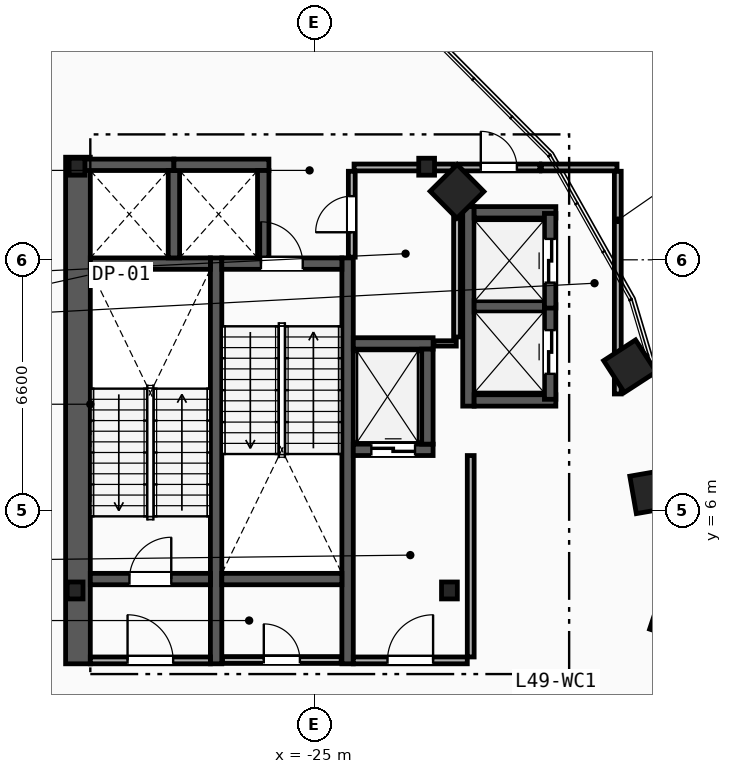
"""IFC4 building model, lengths in metres.
Left out: names, types, materials, properties, quantities, classifications, styles, units other than length and angle.
Written with IfcOpenShell. Run it as: python <this file> out.ifc"""

import sys

from ifc_helpers import new_model, si_unit, direction, frame, frame_2d, origin, origin_2d, place, context, subcontext, project, spatial, rectangle, i_section, extrude, element, fill, save


model = new_model("IFC4")
c1 = context("Model", 3, precision=1e-05, world=origin(), true_north=direction((0.0, 1.0)))
c2 = subcontext(c1, "Body", "Model", "MODEL_VIEW")
j1 = project(units=[si_unit("LENGTHUNIT", "METRE"), si_unit("PLANEANGLEUNIT", "RADIAN")], contexts=[c1])
p1 = place(None, origin())
s1 = spatial("IfcSite", under=j1, at=p1, CompositionType="ELEMENT")
p2 = place(p1, origin())
s2 = spatial("IfcBuilding", under=s1, at=p2, CompositionType="ELEMENT")
p3 = place(p2, frame((0.0, 0.0, 187.2)))
s3 = spatial("IfcBuildingStorey", under=s2, at=p3, CompositionType="ELEMENT", Elevation=187.2)
for number, where, z_axis, x_axis in (
    (1, (-31.3, 3.9, 0.0), (0.0, 0.0, 1.0), (1.0, 0.0, 0.0)),
    (2, (-21.45, 3.9, 0.0), (0.0, 0.0, 1.0), (1.0, 0.0, 0.0)),
    (3, (-22.05, 15.05, 0.0), (0.0, 0.0, 1.0), (1.0, 0.0, 0.0)),
    (4, (-31.25, 15.05, 0.0), (0.0, 0.0, 1.0), (1.0, 0.0, 0.0)),
):
    element("IfcColumn", number, at=place(p3, frame(where, z_axis=z_axis, x_axis=x_axis)), inside=s3, PredefinedType="COLUMN", context=c2, shape_type="SweptSolid", body=[
        extrude(i_section(OverallWidth=0.416, OverallDepth=0.446, WebThickness=0.039, FlangeThickness=0.063, FilletRadius=0.018, at=origin_2d()), origin(), (0.0, 0.0, 1.0), 4.6),
    ])
for number, where, z_axis, x_axis in (
    (5, (-15.55, 3.2, 0.0), (0.0, 0.0, 1.0), (0.315, 0.949, 0.0)),
    (6, (-16.125, 6.5, 0.0), (0.0, 0.0, 1.0), (-0.172, 0.985, 0.0)),
    (7, (-16.7, 9.8, 0.0), (0.0, 0.0, 1.0), (-0.544, 0.839, 0.0)),
    (8, (-21.25, 14.4, 0.0), (0.0, 0.0, 1.0), (-0.703, 0.711, 0.0)),
):
    element("IfcColumn", number, at=place(p3, frame(where, z_axis=z_axis, x_axis=x_axis)), inside=s3, PredefinedType="COLUMN", context=c2, shape_type="SweptSolid", body=[
        extrude(rectangle(XDim=1.0, YDim=1.0, at=origin_2d()), origin(), (0.0, 0.0, 1.0), 4.6),
    ])
p4 = place(p3, frame((-31.225, 1.97, 0.0), z_axis=(0.0, 0.0, 1.0), x_axis=(0.0, 1.0, 0.0)))
e9 = element("IfcWall", 9, at=p4, inside=s3, PredefinedType="SHEAR", context=c2, shape_type="SweptSolid", body=[
    extrude(rectangle(XDim=13.33, YDim=0.65, at=frame_2d((6.665, 0.0))), origin(), (0.0, 0.0, 1.0), 4.34),
])
for number, where, z_axis, x_axis in (
    (10, (-27.59, 1.97, 0.0), (0.0, 0.0, 1.0), (0.0, 1.0, 0.0)),
    (11, (-24.13, 1.97, 0.0), (0.0, 0.0, 1.0), (0.0, 1.0, 0.0)),
):
    element("IfcWall", number, at=place(p3, frame(where, z_axis=z_axis, x_axis=x_axis)), inside=s3, PredefinedType="SHEAR", context=c2, shape_type="SweptSolid", body=[
        extrude(rectangle(XDim=10.68, YDim=0.3, at=frame_2d((5.34, 0.0))), origin(), (0.0, 0.0, 1.0), 4.34),
    ])
p5 = place(p3, frame((-30.9, 4.2, 0.0), z_axis=(0.0, 0.0, 1.0), x_axis=(1.0, 0.0, 0.0)))
e12 = element("IfcWall", 12, at=p5, inside=s3, PredefinedType="SHEAR", context=c2, shape_type="SweptSolid", body=[
    extrude(rectangle(XDim=3.16, YDim=0.3, at=frame_2d((1.58, 0.0))), origin(), (0.0, 0.0, 1.0), 4.34),
])
p6 = place(p5, frame((1.03, 0.0, 0.0)))
e13 = element("IfcOpeningElement", 13, at=p6, cuts=e12, PredefinedType="OPENING", context=c2, shape_type="SweptSolid", body=[
    extrude(rectangle(XDim=1.1, YDim=2.15, at=frame_2d((0.55, 1.075))), frame((0.0, 0.16, 0.0), z_axis=(0.0, -1.0, 0.0), x_axis=(1.0, 0.0, 0.0)), (0.0, 0.0, 1.0), 0.32),
])
p7 = place(p3, frame((-30.9, 12.5, 0.0), z_axis=(0.0, 0.0, 1.0), x_axis=(1.0, 0.0, 0.0)))
e14 = element("IfcWall", 14, at=p7, inside=s3, PredefinedType="SHEAR", context=c2, shape_type="SweptSolid", body=[
    extrude(rectangle(XDim=3.16, YDim=0.3, at=frame_2d((1.58, 0.0))), origin(), (0.0, 0.0, 1.0), 4.34),
])
p8 = place(p3, frame((-27.44, 12.5, 0.0), z_axis=(0.0, 0.0, 1.0), x_axis=(1.0, 0.0, 0.0)))
e15 = element("IfcWall", 15, at=p8, inside=s3, PredefinedType="SHEAR", context=c2, shape_type="SweptSolid", body=[
    extrude(rectangle(XDim=3.16, YDim=0.3, at=frame_2d((1.58, 0.0))), origin(), (0.0, 0.0, 1.0), 4.34),
])
p9 = place(p8, frame((1.03, 0.0, 0.0)))
e16 = element("IfcOpeningElement", 16, at=p9, cuts=e15, PredefinedType="OPENING", context=c2, shape_type="SweptSolid", body=[
    extrude(rectangle(XDim=1.1, YDim=2.15, at=frame_2d((0.55, 1.075))), frame((0.0, 0.16, 0.0), z_axis=(0.0, -1.0, 0.0), x_axis=(1.0, 0.0, 0.0)), (0.0, 0.0, 1.0), 0.32),
])
p10 = place(p3, frame((-27.44, 4.2, 0.0), z_axis=(0.0, 0.0, 1.0), x_axis=(1.0, 0.0, 0.0)))
e17 = element("IfcWall", 17, at=p10, inside=s3, PredefinedType="SHEAR", context=c2, shape_type="SweptSolid", body=[
    extrude(rectangle(XDim=3.16, YDim=0.3, at=frame_2d((1.58, 0.0))), origin(), (0.0, 0.0, 1.0), 4.34),
])
p11 = place(p3, frame((-20.89, 2.15, 0.0), z_axis=(0.0, 0.0, 1.0), x_axis=(0.0, 1.0, 0.0)))
e18 = element("IfcWall", 18, at=p11, inside=s3, PredefinedType="PARTITIONING", context=c2, shape_type="SweptSolid", body=[
    extrude(rectangle(XDim=5.3, YDim=0.18, at=frame_2d((2.65, 0.0))), origin(), (0.0, 0.0, 1.0), 4.34),
])
p12 = place(p3, frame((-23.98, 2.06, 0.0), z_axis=(0.0, 0.0, 1.0), x_axis=(1.0, 0.0, 0.0)))
e19 = element("IfcWall", 19, at=p12, inside=s3, PredefinedType="PARTITIONING", context=c2, shape_type="SweptSolid", body=[
    extrude(rectangle(XDim=3.0, YDim=0.18, at=frame_2d((1.5, 0.0))), origin(), (0.0, 0.0, 1.0), 4.34),
])
p13 = place(p12, frame((0.9, 0.0, 0.0)))
e20 = element("IfcOpeningElement", 20, at=p13, cuts=e19, PredefinedType="OPENING", context=c2, shape_type="SweptSolid", body=[
    extrude(rectangle(XDim=1.2, YDim=2.15, at=frame_2d((0.6, 1.075))), frame((0.0, 0.1, 0.0), z_axis=(0.0, -1.0, 0.0), x_axis=(1.0, 0.0, 0.0)), (0.0, 0.0, 1.0), 0.2),
])
p14 = place(p3, frame((-30.9, 2.06, 0.0), z_axis=(0.0, 0.0, 1.0), x_axis=(1.0, 0.0, 0.0)))
e21 = element("IfcWall", 21, at=p14, inside=s3, PredefinedType="PARTITIONING", context=c2, shape_type="SweptSolid", body=[
    extrude(rectangle(XDim=3.16, YDim=0.18, at=frame_2d((1.58, 0.0))), origin(), (0.0, 0.0, 1.0), 4.34),
])
p15 = place(p14, frame((0.98, 0.0, 0.0)))
e22 = element("IfcOpeningElement", 22, at=p15, cuts=e21, PredefinedType="OPENING", context=c2, shape_type="SweptSolid", body=[
    extrude(rectangle(XDim=1.2, YDim=2.15, at=frame_2d((0.6, 1.075))), frame((0.0, 0.1, 0.0), z_axis=(0.0, -1.0, 0.0), x_axis=(1.0, 0.0, 0.0)), (0.0, 0.0, 1.0), 0.2),
])
p16 = place(p3, frame((-23.98, 7.6, 0.0), z_axis=(0.0, 0.0, 1.0), x_axis=(1.0, 0.0, 0.0)))
e23 = element("IfcWall", 23, at=p16, inside=s3, PredefinedType="SHEAR", context=c2, shape_type="SweptSolid", body=[
    extrude(rectangle(XDim=2.1, YDim=0.3, at=frame_2d((1.05, 0.0))), origin(), (0.0, 0.0, 1.0), 4.34),
])
p17 = place(p16, frame((0.475, 0.0, 0.0)))
e24 = element("IfcOpeningElement", 24, at=p17, cuts=e23, PredefinedType="OPENING", context=c2, shape_type="SweptSolid", body=[
    extrude(rectangle(XDim=1.15, YDim=2.2, at=frame_2d((0.575, 1.1))), frame((0.0, 0.16, 0.0), z_axis=(0.0, -1.0, 0.0), x_axis=(1.0, 0.0, 0.0)), (0.0, 0.0, 1.0), 0.32),
])
p18 = place(p3, frame((-23.98, 10.4, 0.0), z_axis=(0.0, 0.0, 1.0), x_axis=(1.0, 0.0, 0.0)))
e25 = element("IfcWall", 25, at=p18, inside=s3, PredefinedType="SHEAR", context=c2, shape_type="SweptSolid", body=[
    extrude(rectangle(XDim=2.1, YDim=0.3, at=frame_2d((1.05, 0.0))), origin(), (0.0, 0.0, 1.0), 4.34),
])
for number, where, z_axis, x_axis in (
    (26, (-22.03, 7.75, 0.0), (0.0, 0.0, 1.0), (0.0, 1.0, 0.0)),
    (27, (-31.2, 15.1, 0.0), (0.0, 0.0, 1.0), (1.0, 0.0, 0.0)),
):
    element("IfcWall", number, at=place(p3, frame(where, z_axis=z_axis, x_axis=x_axis)), inside=s3, PredefinedType="SHEAR", context=c2, shape_type="SweptSolid", body=[
        extrude(rectangle(XDim=2.5, YDim=0.3, at=frame_2d((1.25, 0.0))), origin(), (0.0, 0.0, 1.0), 4.34),
    ])
p19 = place(p3, frame((-28.7, 12.65, 0.0), z_axis=(0.0, 0.0, 1.0), x_axis=(0.0, 1.0, 0.0)))
e28 = element("IfcWall", 28, at=p19, inside=s3, PredefinedType="SHEAR", context=c2, shape_type="SweptSolid", body=[
    extrude(rectangle(XDim=2.3, YDim=0.3, at=frame_2d((1.15, 0.0))), origin(), (0.0, 0.0, 1.0), 4.34),
])
p20 = place(p3, frame((-28.7, 15.1, 0.0), z_axis=(0.0, 0.0, 1.0), x_axis=(1.0, 0.0, 0.0)))
e29 = element("IfcWall", 29, at=p20, inside=s3, PredefinedType="SHEAR", context=c2, shape_type="SweptSolid", body=[
    extrude(rectangle(XDim=2.5, YDim=0.3, at=frame_2d((1.25, 0.0))), origin(), (0.0, 0.0, 1.0), 4.34),
])
p21 = place(p3, frame((-26.35, 12.65, 0.0), z_axis=(0.0, 0.0, 1.0), x_axis=(0.0, 1.0, 0.0)))
e30 = element("IfcWall", 30, at=p21, inside=s3, PredefinedType="SHEAR", context=c2, shape_type="SweptSolid", body=[
    extrude(rectangle(XDim=2.3, YDim=0.3, at=frame_2d((1.15, 0.0))), origin(), (0.0, 0.0, 1.0), 4.34),
])
p22 = place(p3, frame((-20.95, 8.75, 0.0), z_axis=(0.0, 0.0, 1.0), x_axis=(0.0, 1.0, 0.0)))
e31 = element("IfcWall", 31, at=p22, inside=s3, PredefinedType="SHEAR", context=c2, shape_type="SweptSolid", body=[
    extrude(rectangle(XDim=5.25, YDim=0.3, at=frame_2d((2.625, 0.0))), origin(), (0.0, 0.0, 1.0), 4.34),
])
for number, where, z_axis, x_axis in (
    (32, (-20.8, 8.9, 0.0), (0.0, 0.0, 1.0), (1.0, 0.0, 0.0)),
    (33, (-20.8, 13.85, 0.0), (0.0, 0.0, 1.0), (1.0, 0.0, 0.0)),
):
    element("IfcWall", number, at=place(p3, frame(where, z_axis=z_axis, x_axis=x_axis)), inside=s3, PredefinedType="SHEAR", context=c2, shape_type="SweptSolid", body=[
        extrude(rectangle(XDim=2.15, YDim=0.3, at=frame_2d((1.075, 0.0))), origin(), (0.0, 0.0, 1.0), 4.34),
    ])
p23 = place(p3, frame((-20.8, 11.375, 0.0), z_axis=(0.0, 0.0, 1.0), x_axis=(1.0, 0.0, 0.0)))
e34 = element("IfcWall", 34, at=p23, inside=s3, PredefinedType="SHEAR", context=c2, shape_type="SweptSolid", body=[
    extrude(rectangle(XDim=1.85, YDim=0.3, at=frame_2d((0.925, 0.0))), origin(), (0.0, 0.0, 1.0), 4.34),
])
p24 = place(p3, frame((-18.8, 8.93, 0.0), z_axis=(0.0, 0.0, 1.0), x_axis=(0.0, 1.0, 0.0)))
e35 = element("IfcWall", 35, at=p24, inside=s3, PredefinedType="SHEAR", context=c2, shape_type="SweptSolid", body=[
    extrude(rectangle(XDim=2.49, YDim=0.3, at=frame_2d((1.245, 0.0))), origin(), (0.0, 0.0, 1.0), 4.34),
])
p25 = place(p24, frame((0.67, 0.0, 0.0)))
e36 = element("IfcOpeningElement", 36, at=p25, cuts=e35, PredefinedType="OPENING", context=c2, shape_type="SweptSolid", body=[
    extrude(rectangle(XDim=1.15, YDim=2.2, at=frame_2d((0.575, 1.1))), frame((0.0, 0.16, 0.0), z_axis=(0.0, -1.0, 0.0), x_axis=(1.0, 0.0, 0.0)), (0.0, 0.0, 1.0), 0.32),
])
p26 = place(p3, frame((-18.8, 11.33, 0.0), z_axis=(0.0, 0.0, 1.0), x_axis=(0.0, 1.0, 0.0)))
e37 = element("IfcWall", 37, at=p26, inside=s3, PredefinedType="SHEAR", context=c2, shape_type="SweptSolid", body=[
    extrude(rectangle(XDim=2.49, YDim=0.3, at=frame_2d((1.245, 0.0))), origin(), (0.0, 0.0, 1.0), 4.34),
])
p27 = place(p26, frame((0.67, 0.0, 0.0)))
e38 = element("IfcOpeningElement", 38, at=p27, cuts=e37, PredefinedType="OPENING", context=c2, shape_type="SweptSolid", body=[
    extrude(rectangle(XDim=1.15, YDim=2.2, at=frame_2d((0.575, 1.1))), frame((0.0, 0.16, 0.0), z_axis=(0.0, -1.0, 0.0), x_axis=(1.0, 0.0, 0.0)), (0.0, 0.0, 1.0), 0.32),
])
p28 = place(p3, frame((-17.02, 9.07, 0.0), z_axis=(0.0, 0.0, 1.0), x_axis=(0.0, 1.0, 0.0)))
e39 = element("IfcWall", 39, at=p28, inside=s3, PredefinedType="PARTITIONING", context=c2, shape_type="SweptSolid", body=[
    extrude(rectangle(XDim=5.86, YDim=0.18, at=frame_2d((2.93, 0.0))), origin(), (0.0, 0.0, 1.0), 4.34),
])
p29 = place(p3, frame((-21.23, 15.03, 0.0), z_axis=(0.0, 0.0, 1.0), x_axis=(1.0, 0.0, 0.0)))
e40 = element("IfcWall", 40, at=p29, inside=s3, PredefinedType="PARTITIONING", context=c2, shape_type="SweptSolid", body=[
    extrude(rectangle(XDim=2.16, YDim=0.18, at=frame_2d((1.08, 0.0))), origin(), (0.0, 0.0, 1.0), 4.34),
])
p30 = place(p29, frame((0.605, 0.0, 0.0)))
e41 = element("IfcOpeningElement", 41, at=p30, cuts=e40, PredefinedType="OPENING", context=c2, shape_type="SweptSolid", body=[
    extrude(rectangle(XDim=0.95, YDim=2.1, at=frame_2d((0.475, 1.05))), frame((0.0, 0.1, 0.0), z_axis=(0.0, -1.0, 0.0), x_axis=(1.0, 0.0, 0.0)), (0.0, 0.0, 1.0), 0.2),
])
p31 = place(p3, frame((-19.03, 15.03, 0.0), z_axis=(0.0, 0.0, 1.0), x_axis=(1.0, 0.0, 0.0)))
e42 = element("IfcWall", 42, at=p31, inside=s3, PredefinedType="PARTITIONING", context=c2, shape_type="SweptSolid", body=[
    extrude(rectangle(XDim=1.99, YDim=0.18, at=frame_2d((0.995, 0.0))), origin(), (0.0, 0.0, 1.0), 4.34),
])
p32 = place(p3, frame((-21.86, 10.4, 0.0), z_axis=(0.0, 0.0, 1.0), x_axis=(1.0, 0.0, 0.0)))
e43 = element("IfcWall", 43, at=p32, inside=s3, PredefinedType="PARTITIONING", context=c2, shape_type="SweptSolid", body=[
    extrude(rectangle(XDim=0.59, YDim=0.14, at=frame_2d((0.295, 0.0))), origin(), (0.0, 0.0, 1.0), 4.34),
])
p33 = place(p3, frame((-21.25, 10.57, 0.0), z_axis=(0.0, 0.0, 1.0), x_axis=(0.0, 1.0, 0.0)))
e44 = element("IfcWall", 44, at=p33, inside=s3, PredefinedType="PARTITIONING", context=c2, shape_type="SweptSolid", body=[
    extrude(rectangle(XDim=4.36, YDim=0.18, at=frame_2d((2.18, 0.0))), origin(), (0.0, 0.0, 1.0), 4.34),
])
p34 = place(p3, frame((-23.96, 15.03, 0.0), z_axis=(0.0, 0.0, 1.0), x_axis=(1.0, 0.0, 0.0)))
e45 = element("IfcWall", 45, at=p34, inside=s3, PredefinedType="PARTITIONING", context=c2, shape_type="SweptSolid", body=[
    extrude(rectangle(XDim=2.61, YDim=0.18, at=frame_2d((1.305, 0.0))), origin(), (0.0, 0.0, 1.0), 3.413),
])
p35 = place(p3, frame((-27.42, 2.07, 0.0), z_axis=(0.0, 0.0, 1.0), x_axis=(1.0, 0.0, 0.0)))
e46 = element("IfcWall", 46, at=p35, inside=s3, PredefinedType="PARTITIONING", context=c2, shape_type="SweptSolid", body=[
    extrude(rectangle(XDim=3.12, YDim=0.18, at=frame_2d((1.56, 0.0))), origin(), (0.0, 0.0, 1.0), 4.34),
])
p36 = place(p35, frame((1.085, 0.0, 0.0)))
e47 = element("IfcOpeningElement", 47, at=p36, cuts=e46, PredefinedType="OPENING", context=c2, shape_type="SweptSolid", body=[
    extrude(rectangle(XDim=0.95, YDim=2.1, at=frame_2d((0.475, 1.05))), frame((0.0, 0.1, 0.0), z_axis=(0.0, -1.0, 0.0), x_axis=(1.0, 0.0, 0.0)), (0.0, 0.0, 1.0), 0.2),
])
p37 = place(p3, frame((-24.02, 12.67, 0.0), z_axis=(0.0, 0.0, 1.0), x_axis=(0.0, 1.0, 0.0)))
e48 = element("IfcWall", 48, at=p37, inside=s3, PredefinedType="PARTITIONING", context=c2, shape_type="SweptSolid", body=[
    extrude(rectangle(XDim=2.26, YDim=0.18, at=frame_2d((1.13, 0.0))), origin(), (0.0, 0.0, 1.0), 4.34),
])
p38 = place(p37, frame((0.655, 0.0, 0.0)))
e49 = element("IfcOpeningElement", 49, at=p38, cuts=e48, PredefinedType="OPENING", context=c2, shape_type="SweptSolid", body=[
    extrude(rectangle(XDim=0.95, YDim=2.1, at=frame_2d((0.475, 1.05))), frame((0.0, 0.1, 0.0), z_axis=(0.0, -1.0, 0.0), x_axis=(1.0, 0.0, 0.0)), (0.0, 0.0, 1.0), 0.2),
])
p39 = place(p6, origin())
e50 = element("IfcDoor", 50, at=p39, inside=s3, OperationType="SINGLE_SWING_RIGHT", PredefinedType="DOOR", context=c2, shape_type="SweptSolid", body=[
    extrude(rectangle(XDim=1.1, YDim=2.15, at=frame_2d((0.55, 1.075))), frame((0.0, 0.025, 0.0), z_axis=(0.0, -1.0, 0.0), x_axis=(1.0, 0.0, 0.0)), (0.0, 0.0, 1.0), 0.05),
])
fill(e13, e50)
p40 = place(p9, origin())
e51 = element("IfcDoor", 51, at=p40, inside=s3, OperationType="SINGLE_SWING_LEFT", PredefinedType="DOOR", context=c2, shape_type="SweptSolid", body=[
    extrude(rectangle(XDim=1.1, YDim=2.15, at=frame_2d((0.55, 1.075))), frame((0.0, 0.025, 0.0), z_axis=(0.0, -1.0, 0.0), x_axis=(1.0, 0.0, 0.0)), (0.0, 0.0, 1.0), 0.05),
])
fill(e16, e51)
p41 = place(p13, origin())
e52 = element("IfcDoor", 52, at=p41, inside=s3, OperationType="SINGLE_SWING_RIGHT", PredefinedType="DOOR", context=c2, shape_type="SweptSolid", body=[
    extrude(rectangle(XDim=1.2, YDim=2.15, at=frame_2d((0.6, 1.075))), frame((0.0, 0.025, 0.0), z_axis=(0.0, -1.0, 0.0), x_axis=(1.0, 0.0, 0.0)), (0.0, 0.0, 1.0), 0.05),
])
fill(e20, e52)
p42 = place(p15, origin())
e53 = element("IfcDoor", 53, at=p42, inside=s3, OperationType="SINGLE_SWING_LEFT", PredefinedType="DOOR", context=c2, shape_type="SweptSolid", body=[
    extrude(rectangle(XDim=1.2, YDim=2.15, at=frame_2d((0.6, 1.075))), frame((0.0, 0.025, 0.0), z_axis=(0.0, -1.0, 0.0), x_axis=(1.0, 0.0, 0.0)), (0.0, 0.0, 1.0), 0.05),
])
fill(e22, e53)
p43 = place(p17, origin())
e54 = element("IfcDoor", 54, at=p43, inside=s3, OperationType="SLIDING_TO_LEFT", PredefinedType="TRAPDOOR", context=c2, shape_type="SweptSolid", body=[
    extrude(rectangle(XDim=1.15, YDim=2.2, at=frame_2d((0.575, 1.1))), frame((0.0, 0.025, 0.0), z_axis=(0.0, -1.0, 0.0), x_axis=(1.0, 0.0, 0.0)), (0.0, 0.0, 1.0), 0.05),
])
fill(e24, e54)
p44 = place(p25, origin())
e55 = element("IfcDoor", 55, at=p44, inside=s3, OperationType="SLIDING_TO_LEFT", PredefinedType="TRAPDOOR", context=c2, shape_type="SweptSolid", body=[
    extrude(rectangle(XDim=1.15, YDim=2.2, at=frame_2d((0.575, 1.1))), frame((0.0, 0.025, 0.0), z_axis=(0.0, -1.0, 0.0), x_axis=(1.0, 0.0, 0.0)), (0.0, 0.0, 1.0), 0.05),
])
fill(e36, e55)
p45 = place(p27, origin())
e56 = element("IfcDoor", 56, at=p45, inside=s3, OperationType="SLIDING_TO_LEFT", PredefinedType="TRAPDOOR", context=c2, shape_type="SweptSolid", body=[
    extrude(rectangle(XDim=1.15, YDim=2.2, at=frame_2d((0.575, 1.1))), frame((0.0, 0.025, 0.0), z_axis=(0.0, -1.0, 0.0), x_axis=(1.0, 0.0, 0.0)), (0.0, 0.0, 1.0), 0.05),
])
fill(e38, e56)
p46 = place(p36, origin())
e57 = element("IfcDoor", 57, at=p46, inside=s3, OperationType="SINGLE_SWING_LEFT", PredefinedType="DOOR", context=c2, shape_type="SweptSolid", body=[
    extrude(rectangle(XDim=0.95, YDim=2.1, at=frame_2d((0.475, 1.05))), frame((0.0, 0.025, 0.0), z_axis=(0.0, -1.0, 0.0), x_axis=(1.0, 0.0, 0.0)), (0.0, 0.0, 1.0), 0.05),
])
fill(e47, e57)
p47 = place(p38, origin())
e58 = element("IfcDoor", 58, at=p47, inside=s3, OperationType="SINGLE_SWING_LEFT", PredefinedType="DOOR", context=c2, shape_type="SweptSolid", body=[
    extrude(rectangle(XDim=0.95, YDim=2.1, at=frame_2d((0.475, 1.05))), frame((0.0, 0.025, 0.0), z_axis=(0.0, -1.0, 0.0), x_axis=(1.0, 0.0, 0.0)), (0.0, 0.0, 1.0), 0.05),
])
fill(e49, e58)
p48 = place(p30, origin())
e59 = element("IfcDoor", 59, at=p48, inside=s3, OperationType="SINGLE_SWING_LEFT", PredefinedType="DOOR", context=c2, shape_type="SweptSolid", body=[
    extrude(rectangle(XDim=0.95, YDim=2.1, at=frame_2d((0.475, 1.05))), frame((0.0, 0.025, 0.0), z_axis=(0.0, -1.0, 0.0), x_axis=(1.0, 0.0, 0.0)), (0.0, 0.0, 1.0), 0.05),
])
fill(e41, e59)
save(model, sys.argv[1])
